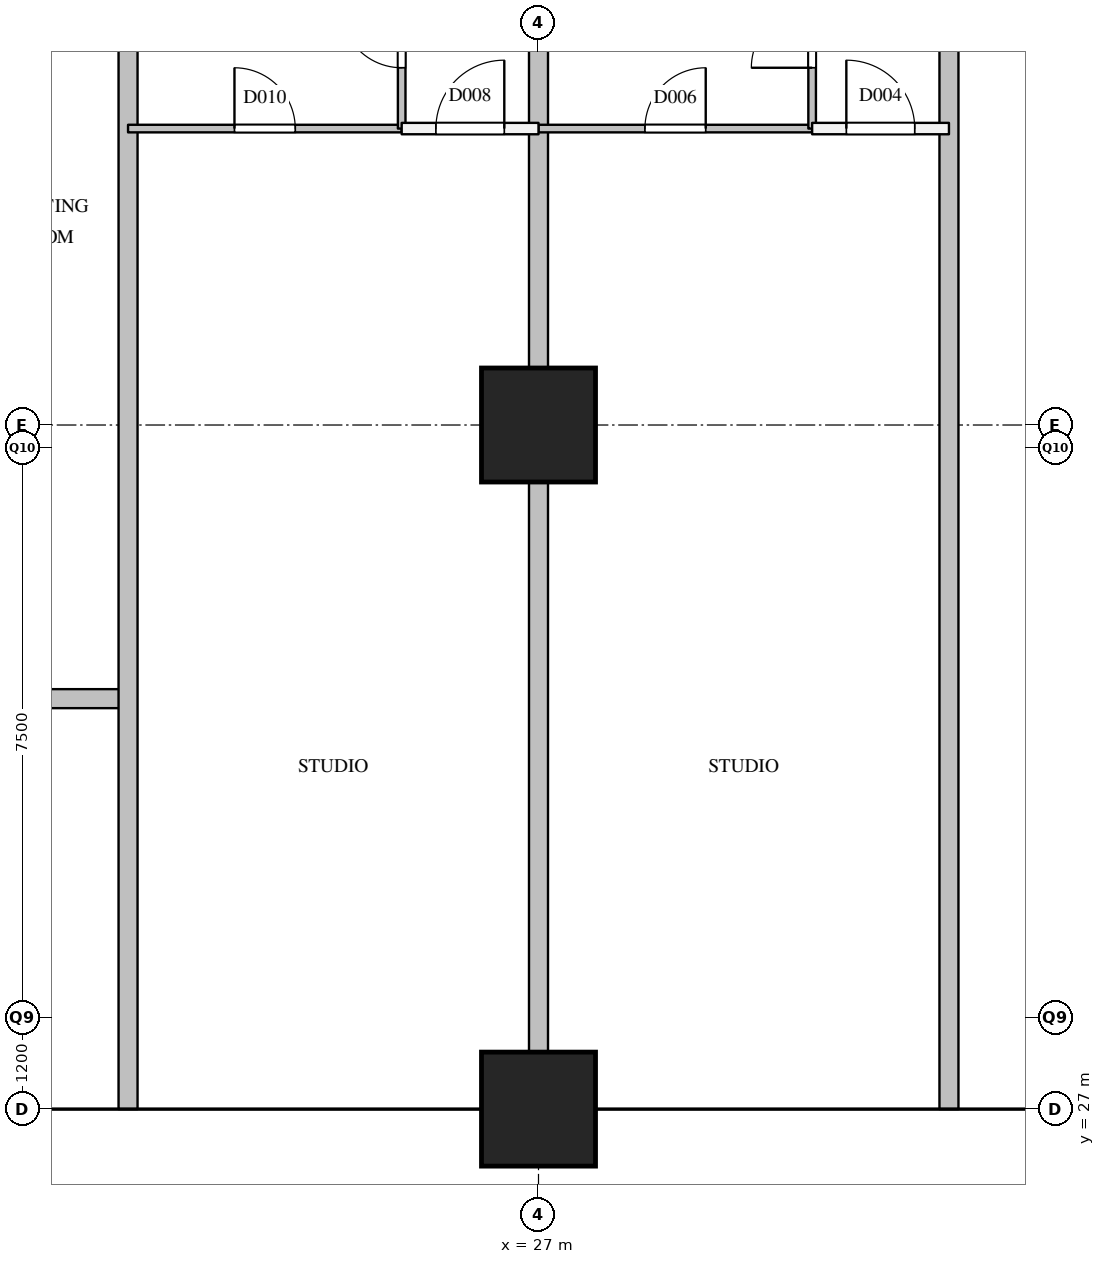
"""IFC4 building model, lengths in metres.
Left out: names, types, materials, properties, quantities, classifications, styles, units other than length and angle.
Written with IfcOpenShell. Run it as: python <this file> out.ifc"""

import sys

from ifc_helpers import new_model, si_unit, direction, frame, frame_2d, origin, origin_2d, place, context, subcontext, project, spatial, rectangle, extrude, element, fill, save


model = new_model("IFC4")
c1 = context("Model", 3, precision=1e-05, world=origin(), true_north=direction((0.0, 1.0)))
c2 = subcontext(c1, "Body", "Model", "MODEL_VIEW")
j1 = project(units=[si_unit("LENGTHUNIT", "METRE"), si_unit("PLANEANGLEUNIT", "RADIAN")], contexts=[c1])
p1 = place(None, origin())
s1 = spatial("IfcSite", under=j1, at=p1, CompositionType="ELEMENT")
p2 = place(p1, origin())
s2 = spatial("IfcBuilding", under=s1, at=p2, CompositionType="ELEMENT")
p3 = place(p2, frame((0.0, 0.0, 193.4)))
s3 = spatial("IfcBuildingStorey", under=s2, at=p3, CompositionType="ELEMENT", Elevation=193.4)
for number, where, z_axis, x_axis in (
    (1, (27.0, 27.0, 0.0), (0.0, 0.0, 1.0), (1.0, 0.0, 0.0)),
    (2, (27.0, 36.0, 0.0), (0.0, 0.0, 1.0), (1.0, 0.0, 0.0)),
):
    element("IfcColumn", number, at=place(p3, frame(where, z_axis=z_axis, x_axis=x_axis)), inside=s3, PredefinedType="COLUMN", context=c2, shape_type="SweptSolid", body=[
        extrude(rectangle(XDim=1.5, YDim=1.5, at=origin_2d()), origin(), (0.0, 0.0, 1.0), 3.9),
    ])
p4 = place(p3, frame((25.2, 39.9, 0.0), z_axis=(0.0, 0.0, 1.0), x_axis=(1.0, 0.0, 0.0)))
e3 = element("IfcWall", 3, at=p4, inside=s3, PredefinedType="PARTITIONING", context=c2, shape_type="SweptSolid", body=[
    extrude(rectangle(XDim=1.8, YDim=0.15, at=frame_2d((0.9, 0.0))), origin(), (0.0, 0.0, 1.0), 2.4),
])
p5 = place(p4, frame((0.45, 0.0, 0.0)))
e4 = element("IfcOpeningElement", 4, at=p5, cuts=e3, PredefinedType="OPENING", context=c2, shape_type="SweptSolid", body=[
    extrude(rectangle(XDim=0.9, YDim=2.1, at=frame_2d((0.45, 1.05))), frame((0.0, 0.085, 0.0), z_axis=(0.0, -1.0, 0.0), x_axis=(1.0, 0.0, 0.0)), (0.0, 0.0, 1.0), 0.17),
])
p6 = place(p3, frame((30.6, 39.9, 0.0), z_axis=(0.0, 0.0, 1.0), x_axis=(1.0, 0.0, 0.0)))
e5 = element("IfcWall", 5, at=p6, inside=s3, PredefinedType="PARTITIONING", context=c2, shape_type="SweptSolid", body=[
    extrude(rectangle(XDim=1.8, YDim=0.15, at=frame_2d((0.9, 0.0))), origin(), (0.0, 0.0, 1.0), 3.4),
])
p7 = place(p6, frame((0.45, 0.0, 0.0)))
e6 = element("IfcOpeningElement", 6, at=p7, cuts=e5, PredefinedType="OPENING", context=c2, shape_type="SweptSolid", body=[
    extrude(rectangle(XDim=0.9, YDim=2.1, at=frame_2d((0.45, 1.05))), frame((0.0, 0.085, 0.0), z_axis=(0.0, -1.0, 0.0), x_axis=(1.0, 0.0, 0.0)), (0.0, 0.0, 1.0), 0.17),
])
p8 = place(p3, frame((19.5, 32.4, 0.0), z_axis=(0.0, 0.0, 1.0), x_axis=(1.0, 0.0, 0.0)))
e7 = element("IfcWall", 7, at=p8, inside=s3, PredefinedType="PARTITIONING", context=c2, shape_type="SweptSolid", body=[
    extrude(rectangle(XDim=2.1, YDim=0.25, at=frame_2d((1.05, 0.0))), origin(), (0.0, 0.0, 1.0), 3.4),
])
for number, where, z_axis, x_axis in (
    (8, (21.6, 27.0, 0.0), (0.0, 0.0, 1.0), (0.0, 1.0, 0.0)),
    (9, (27.0, 27.0, 0.0), (0.0, 0.0, 1.0), (0.0, 1.0, 0.0)),
    (10, (32.4, 27.0, 0.0), (0.0, 0.0, 1.0), (0.0, 1.0, 0.0)),
):
    element("IfcWall", number, at=place(p3, frame(where, z_axis=z_axis, x_axis=x_axis)), inside=s3, PredefinedType="PARTITIONING", context=c2, shape_type="SweptSolid", body=[
        extrude(rectangle(XDim=15.3, YDim=0.25, at=frame_2d((7.65, 0.0))), origin(), (0.0, 0.0, 1.0), 2.4),
    ])
p9 = place(p3, frame((21.6, 39.9, 0.0), z_axis=(0.0, 0.0, 1.0), x_axis=(1.0, 0.0, 0.0)))
e11 = element("IfcWall", 11, at=p9, inside=s3, PredefinedType="PARTITIONING", context=c2, shape_type="SweptSolid", body=[
    extrude(rectangle(XDim=3.6, YDim=0.1, at=frame_2d((1.8, 0.0))), origin(), (0.0, 0.0, 1.0), 3.4),
])
p10 = place(p9, frame((1.4, 0.0, 0.0)))
e12 = element("IfcOpeningElement", 12, at=p10, cuts=e11, PredefinedType="OPENING", context=c2, shape_type="SweptSolid", body=[
    extrude(rectangle(XDim=0.8, YDim=2.1, at=frame_2d((0.4, 1.05))), frame((0.0, 0.06, 0.0), z_axis=(0.0, -1.0, 0.0), x_axis=(1.0, 0.0, 0.0)), (0.0, 0.0, 1.0), 0.12),
])
p11 = place(p3, frame((27.0, 39.9, 0.0), z_axis=(0.0, 0.0, 1.0), x_axis=(1.0, 0.0, 0.0)))
e13 = element("IfcWall", 13, at=p11, inside=s3, PredefinedType="PARTITIONING", context=c2, shape_type="SweptSolid", body=[
    extrude(rectangle(XDim=3.6, YDim=0.1, at=frame_2d((1.8, 0.0))), origin(), (0.0, 0.0, 1.0), 2.4),
])
p12 = place(p11, frame((1.4, 0.0, 0.0)))
e14 = element("IfcOpeningElement", 14, at=p12, cuts=e13, PredefinedType="OPENING", context=c2, shape_type="SweptSolid", body=[
    extrude(rectangle(XDim=0.8, YDim=2.1, at=frame_2d((0.4, 1.05))), frame((0.0, 0.06, 0.0), z_axis=(0.0, -1.0, 0.0), x_axis=(1.0, 0.0, 0.0)), (0.0, 0.0, 1.0), 0.12),
])
p13 = place(p3, frame((25.2, 39.9, 0.0), z_axis=(0.0, 0.0, 1.0), x_axis=(0.0, 1.0, 0.0)))
e15 = element("IfcWall", 15, at=p13, inside=s3, PredefinedType="PARTITIONING", context=c2, shape_type="SweptSolid", body=[
    extrude(rectangle(XDim=2.4, YDim=0.1, at=frame_2d((1.2, 0.0))), origin(), (0.0, 0.0, 1.0), 3.4),
])
p14 = place(p13, frame((0.8, 0.0, 0.0)))
e16 = element("IfcOpeningElement", 16, at=p14, cuts=e15, PredefinedType="OPENING", context=c2, shape_type="SweptSolid", body=[
    extrude(rectangle(XDim=0.8, YDim=2.1, at=frame_2d((0.4, 1.05))), frame((0.0, 0.06, 0.0), z_axis=(0.0, -1.0, 0.0), x_axis=(1.0, 0.0, 0.0)), (0.0, 0.0, 1.0), 0.12),
])
p15 = place(p3, frame((30.6, 39.9, 0.0), z_axis=(0.0, 0.0, 1.0), x_axis=(0.0, 1.0, 0.0)))
e17 = element("IfcWall", 17, at=p15, inside=s3, PredefinedType="PARTITIONING", context=c2, shape_type="SweptSolid", body=[
    extrude(rectangle(XDim=2.4, YDim=0.1, at=frame_2d((1.2, 0.0))), origin(), (0.0, 0.0, 1.0), 3.4),
])
p16 = place(p15, frame((0.8, 0.0, 0.0)))
e18 = element("IfcOpeningElement", 18, at=p16, cuts=e17, PredefinedType="OPENING", context=c2, shape_type="SweptSolid", body=[
    extrude(rectangle(XDim=0.8, YDim=2.1, at=frame_2d((0.4, 1.05))), frame((0.0, 0.06, 0.0), z_axis=(0.0, -1.0, 0.0), x_axis=(1.0, 0.0, 0.0)), (0.0, 0.0, 1.0), 0.12),
])
p17 = place(p7, origin())
e19 = element("IfcDoor", 19, at=p17, inside=s3, OperationType="SINGLE_SWING_LEFT", PredefinedType="DOOR", context=c2, shape_type="SweptSolid", body=[
    extrude(rectangle(XDim=0.9, YDim=2.1, at=frame_2d((0.45, 1.05))), frame((0.0, 0.025, 0.0), z_axis=(0.0, -1.0, 0.0), x_axis=(1.0, 0.0, 0.0)), (0.0, 0.0, 1.0), 0.05),
])
fill(e6, e19)
p18 = place(p16, origin())
e20 = element("IfcDoor", 20, at=p18, inside=s3, OperationType="SINGLE_SWING_LEFT", PredefinedType="DOOR", context=c2, shape_type="SweptSolid", body=[
    extrude(rectangle(XDim=0.8, YDim=2.1, at=frame_2d((0.4, 1.05))), frame((0.0, 0.025, 0.0), z_axis=(0.0, -1.0, 0.0), x_axis=(1.0, 0.0, 0.0)), (0.0, 0.0, 1.0), 0.05),
])
fill(e18, e20)
p19 = place(p12, origin())
e21 = element("IfcDoor", 21, at=p19, inside=s3, OperationType="SINGLE_SWING_RIGHT", PredefinedType="DOOR", context=c2, shape_type="SweptSolid", body=[
    extrude(rectangle(XDim=0.8, YDim=2.1, at=frame_2d((0.4, 1.05))), frame((0.0, 0.025, 0.0), z_axis=(0.0, -1.0, 0.0), x_axis=(1.0, 0.0, 0.0)), (0.0, 0.0, 1.0), 0.05),
])
fill(e14, e21)
p20 = place(p5, origin())
e22 = element("IfcDoor", 22, at=p20, inside=s3, OperationType="SINGLE_SWING_RIGHT", PredefinedType="DOOR", context=c2, shape_type="SweptSolid", body=[
    extrude(rectangle(XDim=0.9, YDim=2.1, at=frame_2d((0.45, 1.05))), frame((0.0, 0.025, 0.0), z_axis=(0.0, -1.0, 0.0), x_axis=(1.0, 0.0, 0.0)), (0.0, 0.0, 1.0), 0.05),
])
fill(e4, e22)
p21 = place(p14, origin())
e23 = element("IfcDoor", 23, at=p21, inside=s3, OperationType="SINGLE_SWING_RIGHT", PredefinedType="DOOR", context=c2, shape_type="SweptSolid", body=[
    extrude(rectangle(XDim=0.8, YDim=2.1, at=frame_2d((0.4, 1.05))), frame((0.0, 0.025, 0.0), z_axis=(0.0, -1.0, 0.0), x_axis=(1.0, 0.0, 0.0)), (0.0, 0.0, 1.0), 0.05),
])
fill(e16, e23)
p22 = place(p10, origin())
e24 = element("IfcDoor", 24, at=p22, inside=s3, OperationType="SINGLE_SWING_LEFT", PredefinedType="DOOR", context=c2, shape_type="SweptSolid", body=[
    extrude(rectangle(XDim=0.8, YDim=2.1, at=frame_2d((0.4, 1.05))), frame((0.0, 0.025, 0.0), z_axis=(0.0, -1.0, 0.0), x_axis=(1.0, 0.0, 0.0)), (0.0, 0.0, 1.0), 0.05),
])
fill(e12, e24)
save(model, sys.argv[1])
